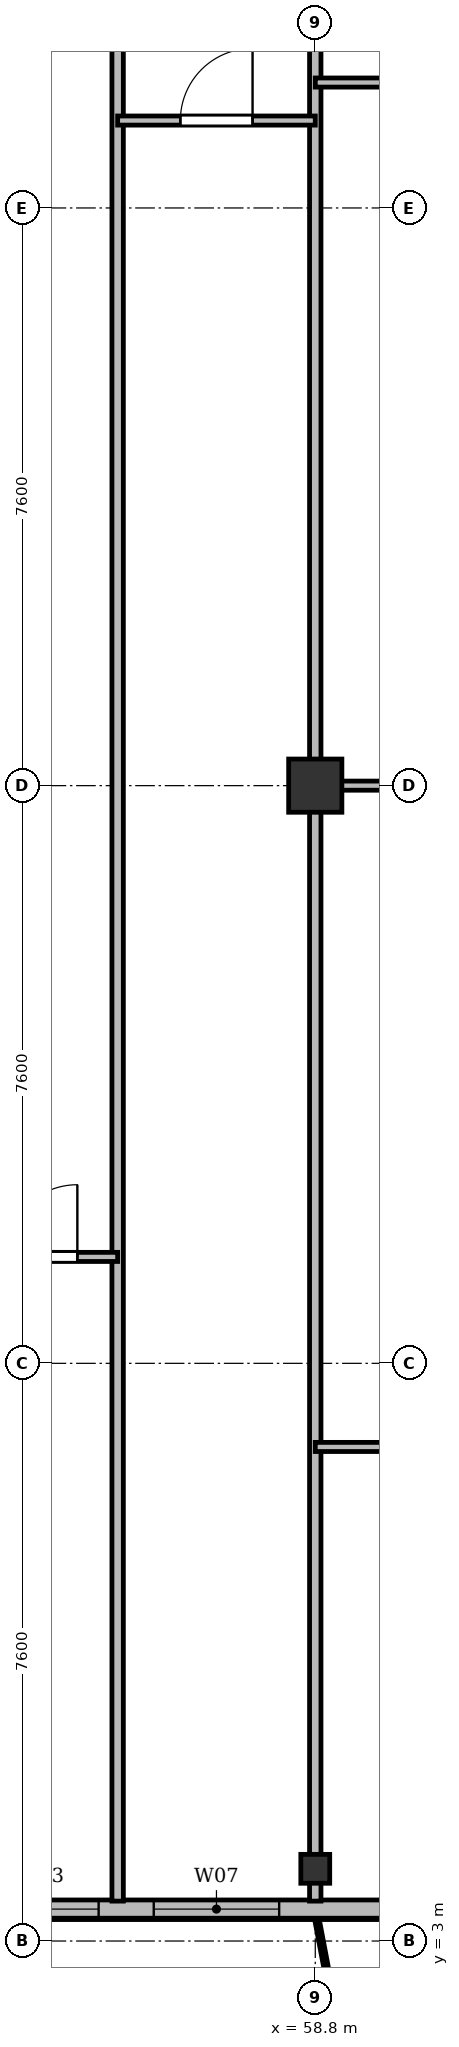
"""IFC4 building model, lengths in metres.
Left out: names, types, materials, properties, quantities, classifications, styles, units other than length and angle.
Written with IfcOpenShell. Run it as: python <this file> out.ifc"""

import sys

from ifc_helpers import new_model, si_unit, direction, frame, frame_2d, origin, origin_2d, place, context, subcontext, project, spatial, rectangle, i_section, extrude, source, transform, mapped, element, fill, save


model = new_model("IFC4")
c1 = context("Model", 3, precision=1e-05, world=origin(), true_north=direction((0.0, 1.0)))
c2 = subcontext(c1, "Body", "Model", "MODEL_VIEW")
j1 = project(units=[si_unit("LENGTHUNIT", "METRE"), si_unit("PLANEANGLEUNIT", "RADIAN")], contexts=[c1])
p1 = place(None, origin())
s1 = spatial("IfcSite", under=j1, at=p1, CompositionType="ELEMENT")
p2 = place(p1, origin())
s2 = spatial("IfcBuilding", under=s1, at=p2, CompositionType="ELEMENT")
p3 = place(p2, frame((0.0, 0.0, 164.5)))
s3 = spatial("IfcBuildingStorey", under=s2, at=p3, CompositionType="ELEMENT", Elevation=164.5)
m1 = source(origin(), c2, "Body", "SweptSolid", [
    extrude(i_section(OverallWidth=0.38, OverallDepth=0.38, WebThickness=0.02, FlangeThickness=0.03, at=origin_2d()), origin(), (0.0, 0.0, 1.0), 3.6),
])
p4 = place(p3, frame((58.8, 3.95, 0.0), z_axis=(0.0, 0.0, 1.0), x_axis=(1.0, 0.0, 0.0)))
e1 = element("IfcColumn", 1, at=p4, inside=s3, PredefinedType="COLUMN", context=c2, shape_type="MappedRepresentation", body=[
    mapped(m1, transform((0.0, 0.0, 0.0), x_axis=(1.0, 0.0, 0.0), y_axis=(0.0, 1.0, 0.0), z_axis=(0.0, 0.0, 1.0), scale=1.0)),
])
m2 = source(origin(), c2, "Body", "SweptSolid", [
    extrude(rectangle(XDim=0.7, YDim=0.7, at=origin_2d()), origin(), (0.0, 0.0, 1.0), 3.6),
])
p5 = place(p3, frame((58.8, 18.2, 0.0), z_axis=(0.0, 0.0, 1.0), x_axis=(1.0, 0.0, 0.0)))
e2 = element("IfcColumn", 2, at=p5, inside=s3, PredefinedType="COLUMN", context=c2, shape_type="MappedRepresentation", body=[
    mapped(m2, transform((0.0, 0.0, 0.0), x_axis=(1.0, 0.0, 0.0), y_axis=(0.0, 1.0, 0.0), z_axis=(0.0, 0.0, 1.0), scale=1.0)),
])
p6 = place(p3, frame((63.6, 3.42, 0.0), z_axis=(0.0, 0.0, 1.0), x_axis=(-1.0, 0.0, 0.0)))
e3 = element("IfcWall", 3, at=p6, inside=s3, PredefinedType="SOLIDWALL", context=c2, shape_type="SweptSolid", body=[
    extrude(rectangle(XDim=52.8, YDim=0.24, at=frame_2d((26.4, 0.0))), origin(), (0.0, 0.0, 1.0), 3.35),
])
p7 = place(p6, frame((1.445, 0.0, 0.9)))
e4 = element("IfcOpeningElement", 4, at=p7, cuts=e3, PredefinedType="OPENING", context=c2, shape_type="SweptSolid", body=[
    extrude(rectangle(XDim=2.0, YDim=1.95, at=frame_2d((1.0, 0.975))), frame((0.0, 0.13, 0.0), z_axis=(0.0, -1.0, 0.0), x_axis=(1.0, 0.0, 0.0)), (0.0, 0.0, 1.0), 0.26),
])
p8 = place(p6, frame((5.275, 0.0, 0.9)))
e5 = element("IfcOpeningElement", 5, at=p8, cuts=e3, PredefinedType="OPENING", context=c2, shape_type="SweptSolid", body=[
    extrude(rectangle(XDim=1.65, YDim=1.85, at=frame_2d((0.825, 0.925))), frame((0.0, 0.13, 0.0), z_axis=(0.0, -1.0, 0.0), x_axis=(1.0, 0.0, 0.0)), (0.0, 0.0, 1.0), 0.26),
])
p9 = place(p6, frame((7.65, 0.0, 0.9)))
e6 = element("IfcOpeningElement", 6, at=p9, cuts=e3, PredefinedType="OPENING", context=c2, shape_type="SweptSolid", body=[
    extrude(rectangle(XDim=1.5, YDim=1.75, at=frame_2d((0.75, 0.875))), frame((0.0, 0.13, 0.0), z_axis=(0.0, -1.0, 0.0), x_axis=(1.0, 0.0, 0.0)), (0.0, 0.0, 1.0), 0.26),
])
p10 = place(p6, frame((9.9, 0.0, 0.9)))
e7 = element("IfcOpeningElement", 7, at=p10, cuts=e3, PredefinedType="OPENING", context=c2, shape_type="SweptSolid", body=[
    extrude(rectangle(XDim=2.2, YDim=1.8, at=frame_2d((1.1, 0.9))), frame((0.0, 0.13, 0.0), z_axis=(0.0, -1.0, 0.0), x_axis=(1.0, 0.0, 0.0)), (0.0, 0.0, 1.0), 0.26),
])
p11 = place(p6, frame((13.62, 0.0, 0.0)))
e8 = element("IfcOpeningElement", 8, at=p11, cuts=e3, PredefinedType="OPENING", context=c2, shape_type="SweptSolid", body=[
    extrude(rectangle(XDim=1.2, YDim=2.2, at=frame_2d((0.6, 1.1))), frame((0.0, 0.13, 0.0), z_axis=(0.0, -1.0, 0.0), x_axis=(1.0, 0.0, 0.0)), (0.0, 0.0, 1.0), 0.26),
])
p12 = place(p6, frame((15.45, 0.0, 0.9)))
e9 = element("IfcOpeningElement", 9, at=p12, cuts=e3, PredefinedType="OPENING", context=c2, shape_type="SweptSolid", body=[
    extrude(rectangle(XDim=1.5, YDim=1.75, at=frame_2d((0.75, 0.875))), frame((0.0, 0.13, 0.0), z_axis=(0.0, -1.0, 0.0), x_axis=(1.0, 0.0, 0.0)), (0.0, 0.0, 1.0), 0.26),
])
p13 = place(p6, frame((17.775, 0.0, 0.9)))
e10 = element("IfcOpeningElement", 10, at=p13, cuts=e3, PredefinedType="OPENING", context=c2, shape_type="SweptSolid", body=[
    extrude(rectangle(XDim=1.65, YDim=1.85, at=frame_2d((0.825, 0.925))), frame((0.0, 0.13, 0.0), z_axis=(0.0, -1.0, 0.0), x_axis=(1.0, 0.0, 0.0)), (0.0, 0.0, 1.0), 0.26),
])
p14 = place(p6, frame((22.2, 0.0, 0.9)))
e11 = element("IfcOpeningElement", 11, at=p14, cuts=e3, PredefinedType="OPENING", context=c2, shape_type="SweptSolid", body=[
    extrude(rectangle(XDim=1.8, YDim=1.8, at=frame_2d((0.9, 0.9))), frame((0.0, 0.13, 0.0), z_axis=(0.0, -1.0, 0.0), x_axis=(1.0, 0.0, 0.0)), (0.0, 0.0, 1.0), 0.26),
])
p15 = place(p6, frame((28.6, 0.0, 0.9)))
e12 = element("IfcOpeningElement", 12, at=p15, cuts=e3, PredefinedType="OPENING", context=c2, shape_type="SweptSolid", body=[
    extrude(rectangle(XDim=2.2, YDim=1.8, at=frame_2d((1.1, 0.9))), frame((0.0, 0.13, 0.0), z_axis=(0.0, -1.0, 0.0), x_axis=(1.0, 0.0, 0.0)), (0.0, 0.0, 1.0), 0.26),
])
p16 = place(p6, frame((35.85, 0.0, 0.9)))
e13 = element("IfcOpeningElement", 13, at=p16, cuts=e3, PredefinedType="OPENING", context=c2, shape_type="SweptSolid", body=[
    extrude(rectangle(XDim=1.5, YDim=1.75, at=frame_2d((0.75, 0.875))), frame((0.0, 0.13, 0.0), z_axis=(0.0, -1.0, 0.0), x_axis=(1.0, 0.0, 0.0)), (0.0, 0.0, 1.0), 0.26),
])
p17 = place(p6, frame((41.656, 0.0, 0.0)))
e14 = element("IfcOpeningElement", 14, at=p17, cuts=e3, PredefinedType="OPENING", context=c2, shape_type="SweptSolid", body=[
    extrude(rectangle(XDim=1.2, YDim=2.2, at=frame_2d((0.6, 1.1))), frame((0.0, 0.13, 0.0), z_axis=(0.0, -1.0, 0.0), x_axis=(1.0, 0.0, 0.0)), (0.0, 0.0, 1.0), 0.26),
])
p18 = place(p6, frame((43.65, 0.0, 0.9)))
e15 = element("IfcOpeningElement", 15, at=p18, cuts=e3, PredefinedType="OPENING", context=c2, shape_type="SweptSolid", body=[
    extrude(rectangle(XDim=1.5, YDim=1.75, at=frame_2d((0.75, 0.875))), frame((0.0, 0.13, 0.0), z_axis=(0.0, -1.0, 0.0), x_axis=(1.0, 0.0, 0.0)), (0.0, 0.0, 1.0), 0.26),
])
p19 = place(p6, frame((45.8, 0.0, 0.9)))
e16 = element("IfcOpeningElement", 16, at=p19, cuts=e3, PredefinedType="OPENING", context=c2, shape_type="SweptSolid", body=[
    extrude(rectangle(XDim=1.8, YDim=1.8, at=frame_2d((0.9, 0.9))), frame((0.0, 0.13, 0.0), z_axis=(0.0, -1.0, 0.0), x_axis=(1.0, 0.0, 0.0)), (0.0, 0.0, 1.0), 0.26),
])
p20 = place(p6, frame((49.255, 0.0, 0.9)))
e17 = element("IfcOpeningElement", 17, at=p20, cuts=e3, PredefinedType="OPENING", context=c2, shape_type="SweptSolid", body=[
    extrude(rectangle(XDim=2.2, YDim=1.8, at=frame_2d((1.1, 0.9))), frame((0.0, 0.13, 0.0), z_axis=(0.0, -1.0, 0.0), x_axis=(1.0, 0.0, 0.0)), (0.0, 0.0, 1.0), 0.26),
])
p21 = place(p3, frame((58.8, 3.525, 0.0), z_axis=(0.0, 0.0, 1.0), x_axis=(0.0, 1.0, 0.0)))
e18 = element("IfcWall", 18, at=p21, inside=s3, PredefinedType="PARTITIONING", context=c2, shape_type="SweptSolid", body=[
    extrude(rectangle(XDim=27.275, YDim=0.15, at=frame_2d((13.638, 0.0))), origin(), (0.0, 0.0, 1.0), 2.85),
])
p22 = place(p3, frame((56.2, 3.525, 0.0), z_axis=(0.0, 0.0, 1.0), x_axis=(0.0, 1.0, 0.0)))
e19 = element("IfcWall", 19, at=p22, inside=s3, PredefinedType="PARTITIONING", context=c2, shape_type="SweptSolid", body=[
    extrude(rectangle(XDim=27.275, YDim=0.15, at=frame_2d((13.638, 0.0))), origin(), (0.0, 0.0, 1.0), 2.75),
])
p23 = place(p3, frame((54.2, 12.0, 0.0), z_axis=(0.0, 0.0, 1.0), x_axis=(1.0, 0.0, 0.0)))
e20 = element("IfcWall", 20, at=p23, inside=s3, PredefinedType="PARTITIONING", context=c2, shape_type="SweptSolid", body=[
    extrude(rectangle(XDim=2.0, YDim=0.12, at=frame_2d((1.0, 0.0))), origin(), (0.0, 0.0, 1.0), 3.35),
])
p24 = place(p23, frame((0.52, 0.0, 0.0)))
e21 = element("IfcOpeningElement", 21, at=p24, cuts=e20, PredefinedType="OPENING", context=c2, shape_type="SweptSolid", body=[
    extrude(rectangle(XDim=0.95, YDim=2.15, at=frame_2d((0.475, 1.075))), frame((0.0, 0.07, 0.0), z_axis=(0.0, -1.0, 0.0), x_axis=(1.0, 0.0, 0.0)), (0.0, 0.0, 1.0), 0.14),
])
p25 = place(p3, frame((56.2, 26.95, 0.0), z_axis=(0.0, 0.0, 1.0), x_axis=(1.0, 0.0, 0.0)))
e22 = element("IfcWall", 22, at=p25, inside=s3, PredefinedType="PARTITIONING", context=c2, shape_type="SweptSolid", body=[
    extrude(rectangle(XDim=2.6, YDim=0.12, at=frame_2d((1.3, 0.0))), origin(), (0.0, 0.0, 1.0), 2.85),
])
p26 = place(p25, frame((0.825, 0.0, 0.0)))
e23 = element("IfcOpeningElement", 23, at=p26, cuts=e22, PredefinedType="OPENING", context=c2, shape_type="SweptSolid", body=[
    extrude(rectangle(XDim=0.95, YDim=2.15, at=frame_2d((0.475, 1.075))), frame((0.0, 0.07, 0.0), z_axis=(0.0, -1.0, 0.0), x_axis=(1.0, 0.0, 0.0)), (0.0, 0.0, 1.0), 0.14),
])
p27 = place(p3, frame((58.8, 18.2, 0.0), z_axis=(0.0, 0.0, 1.0), x_axis=(1.0, 0.0, 0.0)))
e24 = element("IfcWall", 24, at=p27, inside=s3, PredefinedType="PARTITIONING", context=c2, shape_type="SweptSolid", body=[
    extrude(rectangle(XDim=7.56, YDim=0.12, at=frame_2d((3.78, 0.0))), origin(), (0.0, 0.0, 1.0), 2.75),
])
p28 = place(p27, frame((3.305, 0.0, 0.0)))
e25 = element("IfcOpeningElement", 25, at=p28, cuts=e24, PredefinedType="OPENING", context=c2, shape_type="SweptSolid", body=[
    extrude(rectangle(XDim=0.95, YDim=2.15, at=frame_2d((0.475, 1.075))), frame((0.0, 0.07, 0.0), z_axis=(0.0, -1.0, 0.0), x_axis=(1.0, 0.0, 0.0)), (0.0, 0.0, 1.0), 0.14),
])
p29 = place(p3, frame((58.8, 27.45, 0.0), z_axis=(0.0, 0.0, 1.0), x_axis=(1.0, 0.0, 0.0)))
e26 = element("IfcWall", 26, at=p29, inside=s3, PredefinedType="PARTITIONING", context=c2, shape_type="SweptSolid", body=[
    extrude(rectangle(XDim=2.4, YDim=0.12, at=frame_2d((1.2, 0.0))), origin(), (0.0, 0.0, 1.0), 2.85),
])
p30 = place(p3, frame((58.8, 9.5, 0.0), z_axis=(0.0, 0.0, 1.0), x_axis=(1.0, 0.0, 0.0)))
e27 = element("IfcWall", 27, at=p30, inside=s3, PredefinedType="PARTITIONING", context=c2, shape_type="SweptSolid", body=[
    extrude(rectangle(XDim=7.56, YDim=0.12, at=frame_2d((3.78, 0.0))), origin(), (0.0, 0.0, 1.0), 2.85),
])
p31 = place(p30, frame((3.305, 0.0, 0.0)))
e28 = element("IfcOpeningElement", 28, at=p31, cuts=e27, PredefinedType="OPENING", context=c2, shape_type="SweptSolid", body=[
    extrude(rectangle(XDim=0.95, YDim=2.15, at=frame_2d((0.475, 1.075))), frame((0.0, 0.07, 0.0), z_axis=(0.0, -1.0, 0.0), x_axis=(1.0, 0.0, 0.0)), (0.0, 0.0, 1.0), 0.14),
])
m3 = source(origin(), c2, "Body", "SweptSolid", [
    extrude(rectangle(XDim=1.65, YDim=1.85, at=frame_2d((0.825, 0.925))), frame((0.0, 0.03, 0.0), z_axis=(0.0, -1.0, 0.0), x_axis=(1.0, 0.0, 0.0)), (0.0, 0.0, 1.0), 0.06),
])
p32 = place(p8, origin())
e29 = element("IfcWindow", 29, at=p32, inside=s3, PartitioningType="SINGLE_PANEL", PredefinedType="WINDOW", context=c2, shape_type="MappedRepresentation", body=[
    mapped(m3, transform((0.0, 0.0, 0.0), x_axis=(1.0, 0.0, 0.0), y_axis=(0.0, 1.0, 0.0), z_axis=(0.0, 0.0, 1.0), scale=1.0)),
])
fill(e5, e29)
m4 = source(origin(), c2, "Body", "SweptSolid", [
    extrude(rectangle(XDim=1.5, YDim=1.75, at=frame_2d((0.75, 0.875))), frame((0.0, 0.03, 0.0), z_axis=(0.0, -1.0, 0.0), x_axis=(1.0, 0.0, 0.0)), (0.0, 0.0, 1.0), 0.06),
])
p33 = place(p9, origin())
e30 = element("IfcWindow", 30, at=p33, inside=s3, PartitioningType="SINGLE_PANEL", PredefinedType="WINDOW", context=c2, shape_type="MappedRepresentation", body=[
    mapped(m4, transform((0.0, 0.0, 0.0), x_axis=(1.0, 0.0, 0.0), y_axis=(0.0, 1.0, 0.0), z_axis=(0.0, 0.0, 1.0), scale=1.0)),
])
fill(e6, e30)
m5 = source(origin(), c2, "Body", "SweptSolid", [
    extrude(rectangle(XDim=0.95, YDim=2.15, at=frame_2d((0.475, 1.075))), frame((0.0, 0.025, 0.0), z_axis=(0.0, -1.0, 0.0), x_axis=(1.0, 0.0, 0.0)), (0.0, 0.0, 1.0), 0.05),
])
p34 = place(p24, origin())
e31 = element("IfcDoor", 31, at=p34, inside=s3, OperationType="SINGLE_SWING_RIGHT", PredefinedType="DOOR", context=c2, shape_type="MappedRepresentation", body=[
    mapped(m5, transform((0.0, 0.0, 0.0), x_axis=(1.0, 0.0, 0.0), y_axis=(0.0, 1.0, 0.0), z_axis=(0.0, 0.0, 1.0), scale=1.0)),
])
fill(e21, e31)
p35 = place(p26, origin())
e32 = element("IfcDoor", 32, at=p35, inside=s3, OperationType="SINGLE_SWING_RIGHT", PredefinedType="DOOR", context=c2, shape_type="MappedRepresentation", body=[
    mapped(m5, transform((0.0, 0.0, 0.0), x_axis=(1.0, 0.0, 0.0), y_axis=(0.0, 1.0, 0.0), z_axis=(0.0, 0.0, 1.0), scale=1.0)),
])
fill(e23, e32)
save(model, sys.argv[1])
